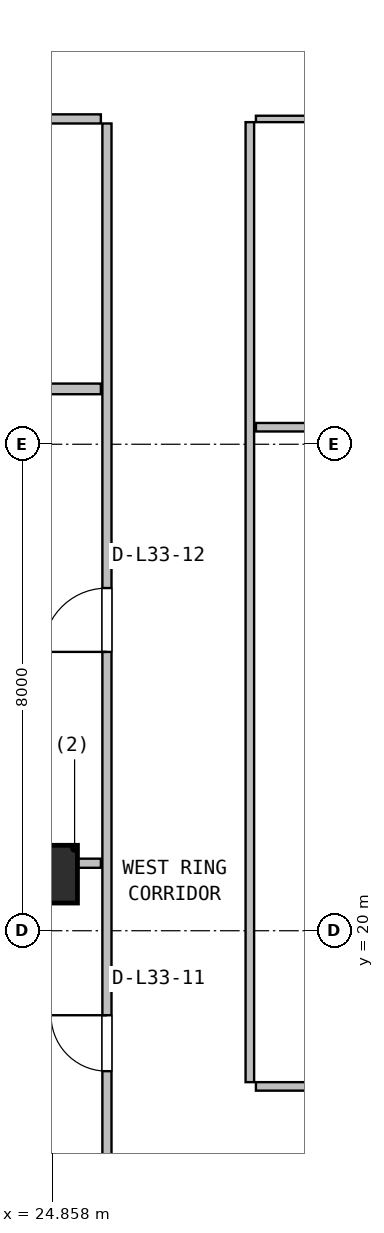
"""IFC4 building model, lengths in metres.
Left out: names, types, materials, properties, quantities, classifications, styles, units other than length and angle.
Written with IfcOpenShell. Run it as: python <this file> out.ifc"""

import sys

from ifc_helpers import new_model, si_unit, direction, frame, frame_2d, origin, origin_2d, place, context, subcontext, project, spatial, rectangle, extrude, source, transform, mapped, element, fill, save


model = new_model("IFC4")
c1 = context("Model", 3, precision=1e-05, world=origin(), true_north=direction((0.0, 1.0)))
c2 = subcontext(c1, "Body", "Model", "MODEL_VIEW")
j1 = project(units=[si_unit("LENGTHUNIT", "METRE"), si_unit("PLANEANGLEUNIT", "RADIAN")], contexts=[c1])
p1 = place(None, origin())
s1 = spatial("IfcSite", under=j1, at=p1, CompositionType="ELEMENT")
p2 = place(p1, origin())
s2 = spatial("IfcBuilding", under=s1, at=p2, CompositionType="ELEMENT")
p3 = place(p2, frame((0.0, 0.0, 137.2)))
s3 = spatial("IfcBuildingStorey", under=s2, at=p3, CompositionType="ELEMENT", Elevation=137.2)
m1 = source(origin(), c2, "Body", "SweptSolid", [
    extrude(rectangle(XDim=0.95, YDim=0.95, at=origin_2d()), origin(), (0.0, 0.0, 1.0), 3.8),
])
p4 = place(p3, frame((24.8, 20.93, 0.0), z_axis=(0.0, 0.0, 1.0), x_axis=(1.0, 0.0, 0.0)))
e1 = element("IfcColumn", 1, at=p4, inside=s3, PredefinedType="COLUMN", context=c2, shape_type="MappedRepresentation", body=[
    mapped(m1, transform((0.0, 0.0, 0.0), x_axis=(1.0, 0.0, 0.0), y_axis=(0.0, 1.0, 0.0), z_axis=(0.0, 0.0, 1.0), scale=1.0)),
])
p5 = place(p3, frame((25.76, 15.178, 0.0), z_axis=(0.0, 0.0, 1.0), x_axis=(0.0, 1.0, 0.0)))
e2 = element("IfcWall", 2, at=p5, inside=s3, PredefinedType="PARTITIONING", context=c2, shape_type="SweptSolid", body=[
    extrude(rectangle(XDim=18.097, YDim=0.15, at=frame_2d((9.048, 0.0))), origin(), (0.0, 0.0, 1.0), 2.76),
])
p6 = place(p5, frame((2.512, 0.0, 0.0)))
e3 = element("IfcOpeningElement", 3, at=p6, cuts=e2, PredefinedType="OPENING", context=c2, shape_type="SweptSolid", body=[
    extrude(rectangle(XDim=0.92, YDim=2.08, at=frame_2d((0.46, 1.04))), frame((0.0, 0.085, 0.0), z_axis=(0.0, -1.0, 0.0), x_axis=(1.0, 0.0, 0.0)), (0.0, 0.0, 1.0), 0.17),
])
p7 = place(p5, frame((9.407, 0.0, 0.0)))
e4 = element("IfcOpeningElement", 4, at=p7, cuts=e2, PredefinedType="OPENING", context=c2, shape_type="SweptSolid", body=[
    extrude(rectangle(XDim=1.05, YDim=2.1, at=frame_2d((0.525, 1.05))), frame((0.0, 0.085, 0.0), z_axis=(0.0, -1.0, 0.0), x_axis=(1.0, 0.0, 0.0)), (0.0, 0.0, 1.0), 0.17),
])
p8 = place(p3, frame((4.68, 21.11, 0.0), z_axis=(0.0, 0.0, 1.0), x_axis=(1.0, 0.0, 0.0)))
e5 = element("IfcWall", 5, at=p8, inside=s3, PredefinedType="PARTITIONING", context=c2, shape_type="SweptSolid", body=[
    extrude(rectangle(XDim=20.98, YDim=0.15, at=frame_2d((10.49, 0.0))), origin(), (0.0, 0.0, 1.0), 2.76),
])
p9 = place(p3, frame((4.68, 28.91, 0.0), z_axis=(0.0, 0.0, 1.0), x_axis=(1.0, 0.0, 0.0)))
e6 = element("IfcWall", 6, at=p9, inside=s3, PredefinedType="PARTITIONING", context=c2, shape_type="SweptSolid", body=[
    extrude(rectangle(XDim=20.98, YDim=0.175, at=frame_2d((10.49, 0.0))), origin(), (0.0, 0.0, 1.0), 2.76),
])
p10 = place(p3, frame((4.68, 33.35, 0.0), z_axis=(0.0, 0.0, 1.0), x_axis=(1.0, 0.0, 0.0)))
e7 = element("IfcWall", 7, at=p10, inside=s3, PredefinedType="PARTITIONING", context=c2, shape_type="SweptSolid", body=[
    extrude(rectangle(XDim=20.98, YDim=0.15, at=frame_2d((10.49, 0.0))), origin(), (0.0, 0.0, 1.0), 2.76),
])
p11 = place(p10, frame((11.985, 0.0, 0.0)))
e8 = element("IfcOpeningElement", 8, at=p11, cuts=e7, PredefinedType="OPENING", context=c2, shape_type="SweptSolid", body=[
    extrude(rectangle(XDim=0.88, YDim=2.06, at=frame_2d((0.44, 1.03))), frame((0.0, 0.085, 0.0), z_axis=(0.0, -1.0, 0.0), x_axis=(1.0, 0.0, 0.0)), (0.0, 0.0, 1.0), 0.17),
])
p12 = place(p3, frame((28.21, 17.44, 0.0), z_axis=(0.0, 0.0, 1.0), x_axis=(1.0, 0.0, 0.0)))
e9 = element("IfcWall", 9, at=p12, inside=s3, PredefinedType="PARTITIONING", context=c2, shape_type="SweptSolid", body=[
    extrude(rectangle(XDim=16.79, YDim=0.14, at=frame_2d((8.395, 0.0))), origin(), (0.0, 0.0, 1.0), 2.76),
])
p13 = place(p12, frame((7.895, 0.0, 0.0)))
e10 = element("IfcOpeningElement", 10, at=p13, cuts=e9, PredefinedType="OPENING", context=c2, shape_type="SweptSolid", body=[
    extrude(rectangle(XDim=1.0, YDim=2.1, at=frame_2d((0.5, 1.05))), frame((0.0, 0.08, 0.0), z_axis=(0.0, -1.0, 0.0), x_axis=(1.0, 0.0, 0.0)), (0.0, 0.0, 1.0), 0.16),
])
p14 = place(p3, frame((28.21, 28.28, 0.0), z_axis=(0.0, 0.0, 1.0), x_axis=(1.0, 0.0, 0.0)))
e11 = element("IfcWall", 11, at=p14, inside=s3, PredefinedType="PARTITIONING", context=c2, shape_type="SweptSolid", body=[
    extrude(rectangle(XDim=16.79, YDim=0.14, at=frame_2d((8.395, 0.0))), origin(), (0.0, 0.0, 1.0), 2.76),
])
p15 = place(p3, frame((28.11, 17.51, 0.0), z_axis=(0.0, 0.0, 1.0), x_axis=(0.0, 1.0, 0.0)))
e12 = element("IfcWall", 12, at=p15, inside=s3, PredefinedType="PARTITIONING", context=c2, shape_type="SweptSolid", body=[
    extrude(rectangle(XDim=15.787, YDim=0.14, at=frame_2d((7.894, 0.0))), origin(), (0.0, 0.0, 1.0), 2.76),
])
p16 = place(p3, frame((28.21, 33.35, 0.0), z_axis=(0.0, 0.0, 1.0), x_axis=(1.0, 0.0, 0.0)))
e13 = element("IfcWall", 13, at=p16, inside=s3, PredefinedType="PARTITIONING", context=c2, shape_type="SweptSolid", body=[
    extrude(rectangle(XDim=16.79, YDim=0.105, at=frame_2d((8.395, 0.0))), origin(), (0.0, 0.0, 1.0), 2.76),
])
p17 = place(p16, frame((7.955, 0.0, 0.0)))
e14 = element("IfcOpeningElement", 14, at=p17, cuts=e13, PredefinedType="OPENING", context=c2, shape_type="SweptSolid", body=[
    extrude(rectangle(XDim=0.88, YDim=2.06, at=frame_2d((0.44, 1.03))), frame((0.0, 0.062, 0.0), z_axis=(0.0, -1.0, 0.0), x_axis=(1.0, 0.0, 0.0)), (0.0, 0.0, 1.0), 0.125),
])
m2 = source(origin(), c2, "Body", "SweptSolid", [
    extrude(rectangle(XDim=0.92, YDim=2.08, at=frame_2d((0.46, 1.04))), frame((0.0, 0.025, 0.0), z_axis=(0.0, -1.0, 0.0), x_axis=(1.0, 0.0, 0.0)), (0.0, 0.0, 1.0), 0.05),
])
p18 = place(p6, origin())
e15 = element("IfcDoor", 15, at=p18, inside=s3, OperationType="SINGLE_SWING_RIGHT", PredefinedType="DOOR", context=c2, shape_type="MappedRepresentation", body=[
    mapped(m2, transform((0.0, 0.0, 0.0), x_axis=(1.0, 0.0, 0.0), y_axis=(0.0, 1.0, 0.0), z_axis=(0.0, 0.0, 1.0), scale=1.0)),
])
fill(e3, e15)
m3 = source(origin(), c2, "Body", "SweptSolid", [
    extrude(rectangle(XDim=1.05, YDim=2.1, at=frame_2d((0.525, 1.05))), frame((0.0, 0.025, 0.0), z_axis=(0.0, -1.0, 0.0), x_axis=(1.0, 0.0, 0.0)), (0.0, 0.0, 1.0), 0.05),
])
p19 = place(p7, origin())
e16 = element("IfcDoor", 16, at=p19, inside=s3, OperationType="SINGLE_SWING_LEFT", PredefinedType="DOOR", context=c2, shape_type="MappedRepresentation", body=[
    mapped(m3, transform((0.0, 0.0, 0.0), x_axis=(1.0, 0.0, 0.0), y_axis=(0.0, 1.0, 0.0), z_axis=(0.0, 0.0, 1.0), scale=1.0)),
])
fill(e4, e16)
save(model, sys.argv[1])
